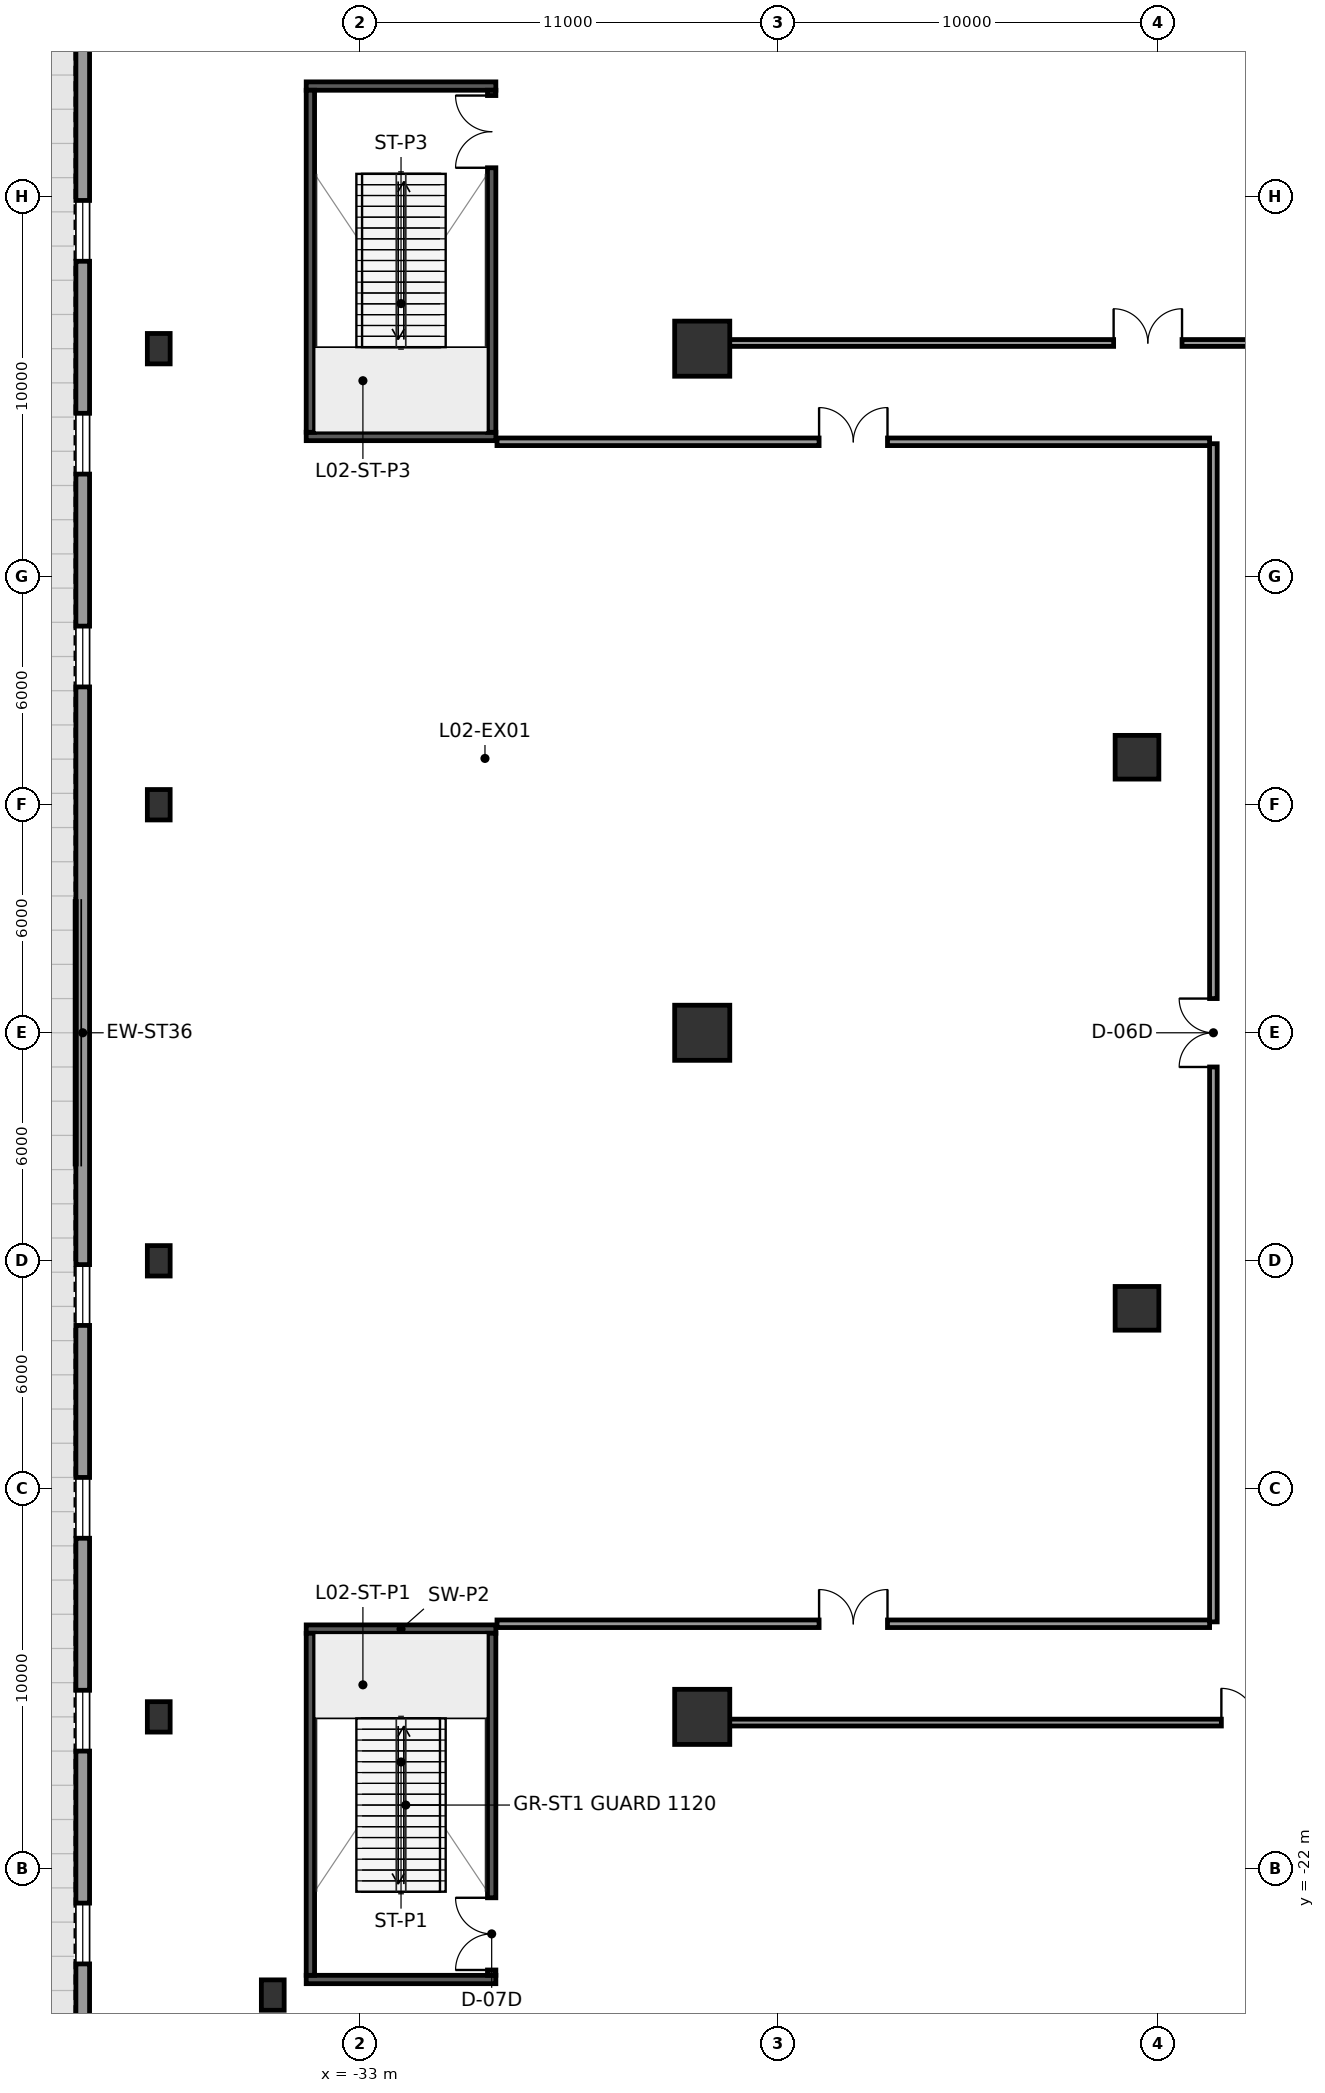
"""IFC4 building model, lengths in metres.
Left out: names, types, materials, properties, quantities, classifications, styles, units other than length and angle.
Written with IfcOpenShell. Run it as: python <this file> out.ifc"""

import sys

from ifc_helpers import new_model, si_unit, direction, frame, frame_2d, origin, origin_2d, place, context, subcontext, project, spatial, rectangle, hollow_rectangle, extrude, element, fill, save


model = new_model("IFC4")
c1 = context("Model", 3, precision=1e-05, world=origin(), true_north=direction((0.0, 1.0)))
c2 = subcontext(c1, "Body", "Model", "MODEL_VIEW")
j1 = project(units=[si_unit("LENGTHUNIT", "METRE"), si_unit("PLANEANGLEUNIT", "RADIAN")], contexts=[c1])
p1 = place(None, origin())
s1 = spatial("IfcSite", under=j1, at=p1, CompositionType="ELEMENT")
p2 = place(p1, origin())
s2 = spatial("IfcBuilding", under=s1, at=p2, CompositionType="ELEMENT")
p3 = place(p2, frame((0.0, 0.0, 11.5)))
s3 = spatial("IfcBuildingStorey", under=s2, at=p3, CompositionType="ELEMENT", Elevation=11.5)
for number, where, z_axis, x_axis in (
    (1, (-12.56, -7.25, 0.0), (0.0, 0.0, 1.0), (1.0, 0.0, 0.0)),
    (2, (-12.56, 7.25, 0.0), (0.0, 0.0, 1.0), (1.0, 0.0, 0.0)),
):
    element("IfcColumn", number, at=place(p3, frame(where, z_axis=z_axis, x_axis=x_axis)), inside=s3, PredefinedType="COLUMN", context=c2, shape_type="SweptSolid", body=[
        extrude(rectangle(XDim=1.15, YDim=1.15, at=origin_2d()), origin(), (0.0, 0.0, 1.0), 6.0),
    ])
for number, where, z_axis, x_axis in (
    (3, (-24.0, -18.0, 0.0), (0.0, 0.0, 1.0), (1.0, 0.0, 0.0)),
    (4, (-24.0, 0.0, 0.0), (0.0, 0.0, 1.0), (1.0, 0.0, 0.0)),
    (5, (-24.0, 18.0, 0.0), (0.0, 0.0, 1.0), (1.0, 0.0, 0.0)),
):
    element("IfcColumn", number, at=place(p3, frame(where, z_axis=z_axis, x_axis=x_axis)), inside=s3, PredefinedType="COLUMN", context=c2, shape_type="SweptSolid", body=[
        extrude(rectangle(XDim=1.45, YDim=1.45, at=origin_2d()), origin(), (0.0, 0.0, 1.0), 6.0),
    ])
for number, where, z_axis, x_axis in (
    (6, (-38.3, -18.0, 0.0), (0.0, 0.0, 1.0), (1.0, 0.0, 0.0)),
    (7, (-38.3, -6.0, 0.0), (0.0, 0.0, 1.0), (1.0, 0.0, 0.0)),
    (8, (-38.3, 6.0, 0.0), (0.0, 0.0, 1.0), (1.0, 0.0, 0.0)),
    (9, (-38.3, 18.0, 0.0), (0.0, 0.0, 1.0), (1.0, 0.0, 0.0)),
    (10, (-35.3, -25.32, 0.0), (0.0, 0.0, 1.0), (1.0, 0.0, 0.0)),
):
    element("IfcColumn", number, at=place(p3, frame(where, z_axis=z_axis, x_axis=x_axis)), inside=s3, PredefinedType="COLUMN", context=c2, shape_type="SweptSolid", body=[
        extrude(hollow_rectangle(XDim=0.6, YDim=0.8, WallThickness=0.05, at=origin_2d()), origin(), (0.0, 0.0, 1.0), 6.0),
    ])
p4 = place(p3, frame((-40.3, -29.3, 0.0), z_axis=(0.0, 0.0, 1.0), x_axis=(0.0, 1.0, 0.0)))
e11 = element("IfcWall", 11, at=p4, inside=s3, PredefinedType="STANDARD", context=c2, shape_type="SweptSolid", body=[
    extrude(rectangle(XDim=58.6, YDim=0.36, at=frame_2d((29.3, 0.0))), origin(), (0.0, 0.0, 1.0), 5.7),
])
p5 = place(p4, frame((4.8, 0.0, 0.9)))
e12 = element("IfcOpeningElement", 12, at=p5, cuts=e11, PredefinedType="OPENING", context=c2, shape_type="SweptSolid", body=[
    extrude(rectangle(XDim=1.6, YDim=2.6, at=frame_2d((0.8, 1.3))), frame((0.0, 0.19, 0.0), z_axis=(0.0, -1.0, 0.0), x_axis=(1.0, 0.0, 0.0)), (0.0, 0.0, 1.0), 0.38),
])
p6 = place(p4, frame((10.4, 0.0, 0.9)))
e13 = element("IfcOpeningElement", 13, at=p6, cuts=e11, PredefinedType="OPENING", context=c2, shape_type="SweptSolid", body=[
    extrude(rectangle(XDim=1.6, YDim=2.6, at=frame_2d((0.8, 1.3))), frame((0.0, 0.19, 0.0), z_axis=(0.0, -1.0, 0.0), x_axis=(1.0, 0.0, 0.0)), (0.0, 0.0, 1.0), 0.38),
])
p7 = place(p4, frame((16.0, 0.0, 0.9)))
e14 = element("IfcOpeningElement", 14, at=p7, cuts=e11, PredefinedType="OPENING", context=c2, shape_type="SweptSolid", body=[
    extrude(rectangle(XDim=1.6, YDim=2.6, at=frame_2d((0.8, 1.3))), frame((0.0, 0.19, 0.0), z_axis=(0.0, -1.0, 0.0), x_axis=(1.0, 0.0, 0.0)), (0.0, 0.0, 1.0), 0.38),
])
p8 = place(p4, frame((21.6, 0.0, 0.9)))
e15 = element("IfcOpeningElement", 15, at=p8, cuts=e11, PredefinedType="OPENING", context=c2, shape_type="SweptSolid", body=[
    extrude(rectangle(XDim=1.6, YDim=2.6, at=frame_2d((0.8, 1.3))), frame((0.0, 0.19, 0.0), z_axis=(0.0, -1.0, 0.0), x_axis=(1.0, 0.0, 0.0)), (0.0, 0.0, 1.0), 0.38),
])
p9 = place(p4, frame((38.4, 0.0, 0.9)))
e16 = element("IfcOpeningElement", 16, at=p9, cuts=e11, PredefinedType="OPENING", context=c2, shape_type="SweptSolid", body=[
    extrude(rectangle(XDim=1.6, YDim=2.6, at=frame_2d((0.8, 1.3))), frame((0.0, 0.19, 0.0), z_axis=(0.0, -1.0, 0.0), x_axis=(1.0, 0.0, 0.0)), (0.0, 0.0, 1.0), 0.38),
])
p10 = place(p4, frame((44.0, 0.0, 0.9)))
e17 = element("IfcOpeningElement", 17, at=p10, cuts=e11, PredefinedType="OPENING", context=c2, shape_type="SweptSolid", body=[
    extrude(rectangle(XDim=1.6, YDim=2.6, at=frame_2d((0.8, 1.3))), frame((0.0, 0.19, 0.0), z_axis=(0.0, -1.0, 0.0), x_axis=(1.0, 0.0, 0.0)), (0.0, 0.0, 1.0), 0.38),
])
p11 = place(p4, frame((49.6, 0.0, 0.9)))
e18 = element("IfcOpeningElement", 18, at=p11, cuts=e11, PredefinedType="OPENING", context=c2, shape_type="SweptSolid", body=[
    extrude(rectangle(XDim=1.6, YDim=2.6, at=frame_2d((0.8, 1.3))), frame((0.0, 0.19, 0.0), z_axis=(0.0, -1.0, 0.0), x_axis=(1.0, 0.0, 0.0)), (0.0, 0.0, 1.0), 0.38),
])
for number, where, z_axis, x_axis in (
    (19, (-34.42, -24.91, 0.0), (0.0, 0.0, 1.0), (1.0, 0.0, 0.0)),
    (20, (-34.42, -15.69, 0.0), (0.0, 0.0, 1.0), (1.0, 0.0, 0.0)),
):
    element("IfcWall", number, at=place(p3, frame(where, z_axis=z_axis, x_axis=x_axis)), inside=s3, PredefinedType="SHEAR", context=c2, shape_type="SweptSolid", body=[
        extrude(rectangle(XDim=4.99, YDim=0.22, at=frame_2d((2.495, 0.0))), origin(), (0.0, 0.0, 1.0), 5.7),
    ])
p12 = place(p3, frame((-34.31, -24.8, 0.0), z_axis=(0.0, 0.0, 1.0), x_axis=(0.0, 1.0, 0.0)))
e21 = element("IfcWall", 21, at=p12, inside=s3, PredefinedType="SHEAR", context=c2, shape_type="SweptSolid", body=[
    extrude(rectangle(XDim=9.0, YDim=0.22, at=frame_2d((4.5, 0.0))), origin(), (0.0, 0.0, 1.0), 5.7),
])
p13 = place(p3, frame((-29.54, -24.8, 0.0), z_axis=(0.0, 0.0, 1.0), x_axis=(0.0, 1.0, 0.0)))
e22 = element("IfcWall", 22, at=p13, inside=s3, PredefinedType="SHEAR", context=c2, shape_type="SweptSolid", body=[
    extrude(rectangle(XDim=9.0, YDim=0.22, at=frame_2d((4.5, 0.0))), origin(), (0.0, 0.0, 1.0), 5.7),
])
p14 = place(p13, frame((0.14, 0.0, 0.0)))
e23 = element("IfcOpeningElement", 23, at=p14, cuts=e22, PredefinedType="OPENING", context=c2, shape_type="SweptSolid", body=[
    extrude(rectangle(XDim=1.9, YDim=2.2, at=frame_2d((0.95, 1.1))), frame((0.0, 0.12, 0.0), z_axis=(0.0, -1.0, 0.0), x_axis=(1.0, 0.0, 0.0)), (0.0, 0.0, 1.0), 0.24),
])
for number, where, z_axis, x_axis in (
    (24, (-34.42, 15.69, 0.0), (0.0, 0.0, 1.0), (1.0, 0.0, 0.0)),
    (25, (-34.42, 24.91, 0.0), (0.0, 0.0, 1.0), (1.0, 0.0, 0.0)),
):
    element("IfcWall", number, at=place(p3, frame(where, z_axis=z_axis, x_axis=x_axis)), inside=s3, PredefinedType="SHEAR", context=c2, shape_type="SweptSolid", body=[
        extrude(rectangle(XDim=4.99, YDim=0.22, at=frame_2d((2.495, 0.0))), origin(), (0.0, 0.0, 1.0), 5.7),
    ])
p15 = place(p3, frame((-34.31, 15.8, 0.0), z_axis=(0.0, 0.0, 1.0), x_axis=(0.0, 1.0, 0.0)))
e26 = element("IfcWall", 26, at=p15, inside=s3, PredefinedType="SHEAR", context=c2, shape_type="SweptSolid", body=[
    extrude(rectangle(XDim=9.0, YDim=0.22, at=frame_2d((4.5, 0.0))), origin(), (0.0, 0.0, 1.0), 5.7),
])
p16 = place(p3, frame((-29.54, 15.8, 0.0), z_axis=(0.0, 0.0, 1.0), x_axis=(0.0, 1.0, 0.0)))
e27 = element("IfcWall", 27, at=p16, inside=s3, PredefinedType="SHEAR", context=c2, shape_type="SweptSolid", body=[
    extrude(rectangle(XDim=9.0, YDim=0.22, at=frame_2d((4.5, 0.0))), origin(), (0.0, 0.0, 1.0), 5.7),
])
p17 = place(p16, frame((6.96, 0.0, 0.0)))
e28 = element("IfcOpeningElement", 28, at=p17, cuts=e27, PredefinedType="OPENING", context=c2, shape_type="SweptSolid", body=[
    extrude(rectangle(XDim=1.9, YDim=2.2, at=frame_2d((0.95, 1.1))), frame((0.0, 0.12, 0.0), z_axis=(0.0, -1.0, 0.0), x_axis=(1.0, 0.0, 0.0)), (0.0, 0.0, 1.0), 0.24),
])
p18 = place(p3, frame((-10.55, -15.5, 0.0), z_axis=(0.0, 0.0, 1.0), x_axis=(0.0, 1.0, 0.0)))
e29 = element("IfcWall", 29, at=p18, inside=s3, PredefinedType="PARTITIONING", context=c2, shape_type="SweptSolid", body=[
    extrude(rectangle(XDim=31.0, YDim=0.2, at=frame_2d((15.5, 0.0))), origin(), (0.0, 0.0, 1.0), 5.7),
])
p19 = place(p18, frame((14.6, 0.0, 0.0)))
e30 = element("IfcOpeningElement", 30, at=p19, cuts=e29, PredefinedType="OPENING", context=c2, shape_type="SweptSolid", body=[
    extrude(rectangle(XDim=1.8, YDim=2.2, at=frame_2d((0.9, 1.1))), frame((0.0, 0.11, 0.0), z_axis=(0.0, -1.0, 0.0), x_axis=(1.0, 0.0, 0.0)), (0.0, 0.0, 1.0), 0.22),
])
p20 = place(p3, frame((-29.4, 15.55, 0.0), z_axis=(0.0, 0.0, 1.0), x_axis=(1.0, 0.0, 0.0)))
e31 = element("IfcWall", 31, at=p20, inside=s3, PredefinedType="PARTITIONING", context=c2, shape_type="SweptSolid", body=[
    extrude(rectangle(XDim=18.75, YDim=0.2, at=frame_2d((9.375, 0.0))), origin(), (0.0, 0.0, 1.0), 5.7),
])
p21 = place(p20, frame((8.475, 0.0, 0.0)))
e32 = element("IfcOpeningElement", 32, at=p21, cuts=e31, PredefinedType="OPENING", context=c2, shape_type="SweptSolid", body=[
    extrude(rectangle(XDim=1.8, YDim=2.2, at=frame_2d((0.9, 1.1))), frame((0.0, 0.11, 0.0), z_axis=(0.0, -1.0, 0.0), x_axis=(1.0, 0.0, 0.0)), (0.0, 0.0, 1.0), 0.22),
])
p22 = place(p3, frame((-29.4, -15.55, 0.0), z_axis=(0.0, 0.0, 1.0), x_axis=(1.0, 0.0, 0.0)))
e33 = element("IfcWall", 33, at=p22, inside=s3, PredefinedType="PARTITIONING", context=c2, shape_type="SweptSolid", body=[
    extrude(rectangle(XDim=18.75, YDim=0.2, at=frame_2d((9.375, 0.0))), origin(), (0.0, 0.0, 1.0), 5.7),
])
p23 = place(p22, frame((8.475, 0.0, 0.0)))
e34 = element("IfcOpeningElement", 34, at=p23, cuts=e33, PredefinedType="OPENING", context=c2, shape_type="SweptSolid", body=[
    extrude(rectangle(XDim=1.8, YDim=2.2, at=frame_2d((0.9, 1.1))), frame((0.0, 0.11, 0.0), z_axis=(0.0, -1.0, 0.0), x_axis=(1.0, 0.0, 0.0)), (0.0, 0.0, 1.0), 0.22),
])
p24 = place(p3, frame((-23.6, 18.15, 0.0), z_axis=(0.0, 0.0, 1.0), x_axis=(1.0, 0.0, 0.0)))
e35 = element("IfcWall", 35, at=p24, inside=s3, PredefinedType="PARTITIONING", context=c2, shape_type="SweptSolid", body=[
    extrude(rectangle(XDim=37.75, YDim=0.18, at=frame_2d((18.875, 0.0))), origin(), (0.0, 0.0, 1.0), 3.88),
])
p25 = place(p24, frame((10.425, 0.0, 0.0)))
e36 = element("IfcOpeningElement", 36, at=p25, cuts=e35, PredefinedType="OPENING", context=c2, shape_type="SweptSolid", body=[
    extrude(rectangle(XDim=1.8, YDim=2.2, at=frame_2d((0.9, 1.1))), frame((0.0, 0.1, 0.0), z_axis=(0.0, -1.0, 0.0), x_axis=(1.0, 0.0, 0.0)), (0.0, 0.0, 1.0), 0.2),
])
p26 = place(p3, frame((-23.6, -18.15, 0.0), z_axis=(0.0, 0.0, 1.0), x_axis=(1.0, 0.0, 0.0)))
e37 = element("IfcWall", 37, at=p26, inside=s3, PredefinedType="PARTITIONING", context=c2, shape_type="SweptSolid", body=[
    extrude(rectangle(XDim=47.2, YDim=0.18, at=frame_2d((23.6, 0.0))), origin(), (0.0, 0.0, 1.0), 3.88),
])
p27 = place(p26, frame((13.26, 0.0, 0.0)))
e38 = element("IfcOpeningElement", 38, at=p27, cuts=e37, PredefinedType="OPENING", context=c2, shape_type="SweptSolid", body=[
    extrude(rectangle(XDim=1.8, YDim=2.2, at=frame_2d((0.9, 1.1))), frame((0.0, 0.1, 0.0), z_axis=(0.0, -1.0, 0.0), x_axis=(1.0, 0.0, 0.0)), (0.0, 0.0, 1.0), 0.2),
])
p28 = place(p5, origin())
e39 = element("IfcWindow", 39, at=p28, inside=s3, PartitioningType="DOUBLE_PANEL_VERTICAL", PredefinedType="WINDOW", context=c2, shape_type="SweptSolid", body=[
    extrude(rectangle(XDim=1.6, YDim=2.6, at=frame_2d((0.8, 1.3))), frame((0.0, 0.03, 0.0), z_axis=(0.0, -1.0, 0.0), x_axis=(1.0, 0.0, 0.0)), (0.0, 0.0, 1.0), 0.06),
])
fill(e12, e39)
p29 = place(p6, origin())
e40 = element("IfcWindow", 40, at=p29, inside=s3, PartitioningType="DOUBLE_PANEL_VERTICAL", PredefinedType="WINDOW", context=c2, shape_type="SweptSolid", body=[
    extrude(rectangle(XDim=1.6, YDim=2.6, at=frame_2d((0.8, 1.3))), frame((0.0, 0.03, 0.0), z_axis=(0.0, -1.0, 0.0), x_axis=(1.0, 0.0, 0.0)), (0.0, 0.0, 1.0), 0.06),
])
fill(e13, e40)
p30 = place(p7, origin())
e41 = element("IfcWindow", 41, at=p30, inside=s3, PartitioningType="DOUBLE_PANEL_VERTICAL", PredefinedType="WINDOW", context=c2, shape_type="SweptSolid", body=[
    extrude(rectangle(XDim=1.6, YDim=2.6, at=frame_2d((0.8, 1.3))), frame((0.0, 0.03, 0.0), z_axis=(0.0, -1.0, 0.0), x_axis=(1.0, 0.0, 0.0)), (0.0, 0.0, 1.0), 0.06),
])
fill(e14, e41)
p31 = place(p8, origin())
e42 = element("IfcWindow", 42, at=p31, inside=s3, PartitioningType="DOUBLE_PANEL_VERTICAL", PredefinedType="WINDOW", context=c2, shape_type="SweptSolid", body=[
    extrude(rectangle(XDim=1.6, YDim=2.6, at=frame_2d((0.8, 1.3))), frame((0.0, 0.03, 0.0), z_axis=(0.0, -1.0, 0.0), x_axis=(1.0, 0.0, 0.0)), (0.0, 0.0, 1.0), 0.06),
])
fill(e15, e42)
p32 = place(p9, origin())
e43 = element("IfcWindow", 43, at=p32, inside=s3, PartitioningType="DOUBLE_PANEL_VERTICAL", PredefinedType="WINDOW", context=c2, shape_type="SweptSolid", body=[
    extrude(rectangle(XDim=1.6, YDim=2.6, at=frame_2d((0.8, 1.3))), frame((0.0, 0.03, 0.0), z_axis=(0.0, -1.0, 0.0), x_axis=(1.0, 0.0, 0.0)), (0.0, 0.0, 1.0), 0.06),
])
fill(e16, e43)
p33 = place(p10, origin())
e44 = element("IfcWindow", 44, at=p33, inside=s3, PartitioningType="DOUBLE_PANEL_VERTICAL", PredefinedType="WINDOW", context=c2, shape_type="SweptSolid", body=[
    extrude(rectangle(XDim=1.6, YDim=2.6, at=frame_2d((0.8, 1.3))), frame((0.0, 0.03, 0.0), z_axis=(0.0, -1.0, 0.0), x_axis=(1.0, 0.0, 0.0)), (0.0, 0.0, 1.0), 0.06),
])
fill(e17, e44)
p34 = place(p11, origin())
e45 = element("IfcWindow", 45, at=p34, inside=s3, PartitioningType="DOUBLE_PANEL_VERTICAL", PredefinedType="WINDOW", context=c2, shape_type="SweptSolid", body=[
    extrude(rectangle(XDim=1.6, YDim=2.6, at=frame_2d((0.8, 1.3))), frame((0.0, 0.03, 0.0), z_axis=(0.0, -1.0, 0.0), x_axis=(1.0, 0.0, 0.0)), (0.0, 0.0, 1.0), 0.06),
])
fill(e18, e45)
p35 = place(p14, origin())
e46 = element("IfcDoor", 46, at=p35, inside=s3, OperationType="DOUBLE_DOOR_SINGLE_SWING", PredefinedType="DOOR", context=c2, shape_type="SweptSolid", body=[
    extrude(rectangle(XDim=1.9, YDim=2.2, at=frame_2d((0.95, 1.1))), frame((0.0, 0.025, 0.0), z_axis=(0.0, -1.0, 0.0), x_axis=(1.0, 0.0, 0.0)), (0.0, 0.0, 1.0), 0.05),
])
fill(e23, e46)
p36 = place(p17, origin())
e47 = element("IfcDoor", 47, at=p36, inside=s3, OperationType="DOUBLE_DOOR_SINGLE_SWING", PredefinedType="DOOR", context=c2, shape_type="SweptSolid", body=[
    extrude(rectangle(XDim=1.9, YDim=2.2, at=frame_2d((0.95, 1.1))), frame((0.0, 0.025, 0.0), z_axis=(0.0, -1.0, 0.0), x_axis=(1.0, 0.0, 0.0)), (0.0, 0.0, 1.0), 0.05),
])
fill(e28, e47)
p37 = place(p19, origin())
e48 = element("IfcDoor", 48, at=p37, inside=s3, OperationType="DOUBLE_DOOR_SINGLE_SWING", PredefinedType="DOOR", context=c2, shape_type="SweptSolid", body=[
    extrude(rectangle(XDim=1.8, YDim=2.2, at=frame_2d((0.9, 1.1))), frame((0.0, 0.025, 0.0), z_axis=(0.0, -1.0, 0.0), x_axis=(1.0, 0.0, 0.0)), (0.0, 0.0, 1.0), 0.05),
])
fill(e30, e48)
p38 = place(p21, origin())
e49 = element("IfcDoor", 49, at=p38, inside=s3, OperationType="DOUBLE_DOOR_SINGLE_SWING", PredefinedType="DOOR", context=c2, shape_type="SweptSolid", body=[
    extrude(rectangle(XDim=1.8, YDim=2.2, at=frame_2d((0.9, 1.1))), frame((0.0, 0.025, 0.0), z_axis=(0.0, -1.0, 0.0), x_axis=(1.0, 0.0, 0.0)), (0.0, 0.0, 1.0), 0.05),
])
fill(e32, e49)
p39 = place(p23, origin())
e50 = element("IfcDoor", 50, at=p39, inside=s3, OperationType="DOUBLE_DOOR_SINGLE_SWING", PredefinedType="DOOR", context=c2, shape_type="SweptSolid", body=[
    extrude(rectangle(XDim=1.8, YDim=2.2, at=frame_2d((0.9, 1.1))), frame((0.0, 0.025, 0.0), z_axis=(0.0, -1.0, 0.0), x_axis=(1.0, 0.0, 0.0)), (0.0, 0.0, 1.0), 0.05),
])
fill(e34, e50)
p40 = place(p25, origin())
e51 = element("IfcDoor", 51, at=p40, inside=s3, OperationType="DOUBLE_DOOR_SINGLE_SWING", PredefinedType="DOOR", context=c2, shape_type="SweptSolid", body=[
    extrude(rectangle(XDim=1.8, YDim=2.2, at=frame_2d((0.9, 1.1))), frame((0.0, 0.025, 0.0), z_axis=(0.0, -1.0, 0.0), x_axis=(1.0, 0.0, 0.0)), (0.0, 0.0, 1.0), 0.05),
])
fill(e36, e51)
p41 = place(p27, origin())
e52 = element("IfcDoor", 52, at=p41, inside=s3, OperationType="DOUBLE_DOOR_SINGLE_SWING", PredefinedType="DOOR", context=c2, shape_type="SweptSolid", body=[
    extrude(rectangle(XDim=1.8, YDim=2.2, at=frame_2d((0.9, 1.1))), frame((0.0, 0.025, 0.0), z_axis=(0.0, -1.0, 0.0), x_axis=(1.0, 0.0, 0.0)), (0.0, 0.0, 1.0), 0.05),
])
fill(e38, e52)
save(model, sys.argv[1])
